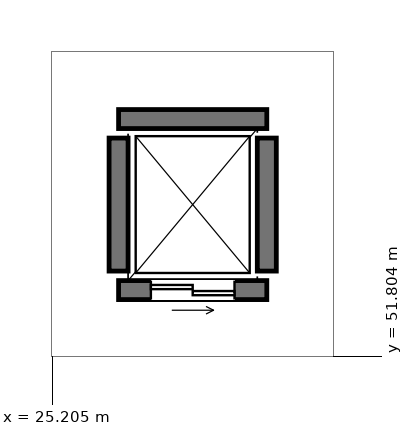
"""IFC4 building model, lengths in metres.
Left out: names, types, materials, properties, quantities, classifications, styles, units other than length and angle.
Written with IfcOpenShell. Run it as: python <this file> out.ifc"""

import sys

from ifc_helpers import new_model, si_unit, direction, frame, frame_2d, origin, place, context, subcontext, project, spatial, rectangle, extrude, element, fill, save


model = new_model("IFC4")
c1 = context("Model", 3, precision=1e-05, world=origin(), true_north=direction((0.0, 1.0)))
c2 = subcontext(c1, "Body", "Model", "MODEL_VIEW")
j1 = project(units=[si_unit("LENGTHUNIT", "METRE"), si_unit("PLANEANGLEUNIT", "RADIAN")], contexts=[c1])
p1 = place(None, origin())
s1 = spatial("IfcSite", under=j1, at=p1, CompositionType="ELEMENT")
p2 = place(p1, origin())
s2 = spatial("IfcBuilding", under=s1, at=p2, CompositionType="ELEMENT")
p3 = place(p2, frame((0.0, 0.0, 10.05)))
s3 = spatial("IfcBuildingStorey", under=s2, at=p3, CompositionType="ELEMENT", Elevation=10.05)
p4 = place(p3, frame((26.075, 52.675, 0.0), z_axis=(0.0, 0.0, 1.0), x_axis=(1.0, 0.0, 0.0)))
e1 = element("IfcWall", 1, at=p4, inside=s3, PredefinedType="SHEAR", context=c2, shape_type="SweptSolid", body=[
    extrude(rectangle(XDim=1.95, YDim=0.25, at=frame_2d((0.975, 0.0))), origin(), (0.0, 0.0, 1.0), 3.98),
])
p5 = place(p4, frame((0.425, 0.0, 0.0)))
e2 = element("IfcOpeningElement", 2, at=p5, cuts=e1, PredefinedType="OPENING", context=c2, shape_type="SweptSolid", body=[
    extrude(rectangle(XDim=1.1, YDim=2.15, at=frame_2d((0.55, 1.075))), frame((0.0, 0.135, 0.0), z_axis=(0.0, -1.0, 0.0), x_axis=(1.0, 0.0, 0.0)), (0.0, 0.0, 1.0), 0.27),
])
p6 = place(p3, frame((26.075, 54.925, 0.0), z_axis=(0.0, 0.0, 1.0), x_axis=(1.0, 0.0, 0.0)))
e3 = element("IfcWall", 3, at=p6, inside=s3, PredefinedType="SHEAR", context=c2, shape_type="SweptSolid", body=[
    extrude(rectangle(XDim=1.95, YDim=0.25, at=frame_2d((0.975, 0.0))), origin(), (0.0, 0.0, 1.0), 3.98),
])
for number, where, z_axis, x_axis in (
    (4, (26.075, 52.925, 0.0), (0.0, 0.0, 1.0), (0.0, 1.0, 0.0)),
    (5, (28.025, 52.925, 0.0), (0.0, 0.0, 1.0), (0.0, 1.0, 0.0)),
):
    element("IfcWall", number, at=place(p3, frame(where, z_axis=z_axis, x_axis=x_axis)), inside=s3, PredefinedType="SHEAR", context=c2, shape_type="SweptSolid", body=[
        extrude(rectangle(XDim=1.75, YDim=0.25, at=frame_2d((0.875, 0.0))), origin(), (0.0, 0.0, 1.0), 3.98),
    ])
p7 = place(p5, origin())
e6 = element("IfcDoor", 6, at=p7, inside=s3, OperationType="DOUBLE_DOOR_SLIDING", PredefinedType="DOOR", context=c2, shape_type="SweptSolid", body=[
    extrude(rectangle(XDim=1.1, YDim=2.15, at=frame_2d((0.55, 1.075))), frame((0.0, 0.025, 0.0), z_axis=(0.0, -1.0, 0.0), x_axis=(1.0, 0.0, 0.0)), (0.0, 0.0, 1.0), 0.05),
])
fill(e2, e6)
save(model, sys.argv[1])
